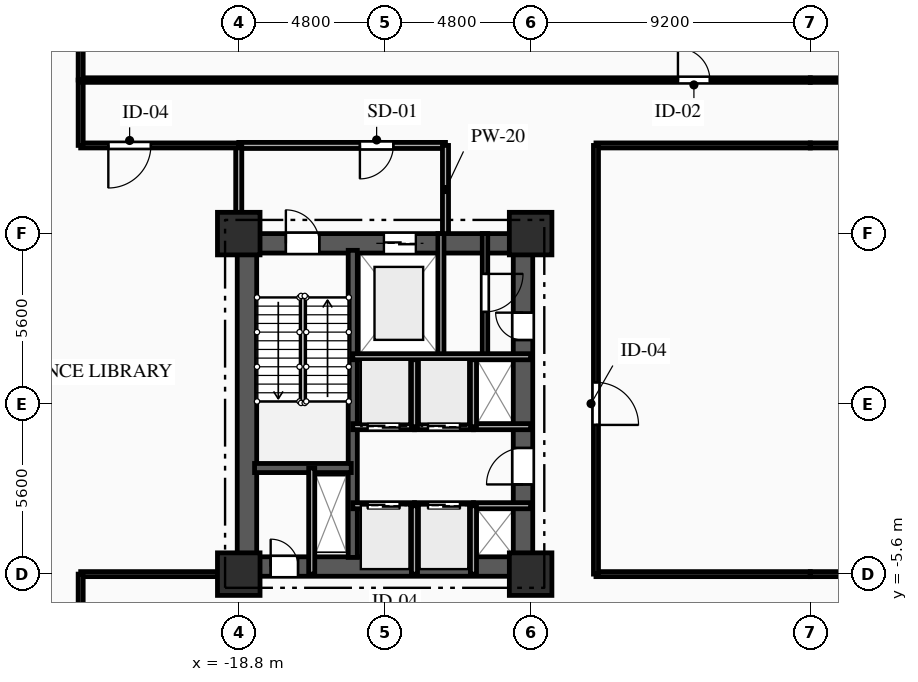
"""IFC4 building model, lengths in metres.
Left out: names, types, materials, properties, quantities, classifications, styles, units other than length and angle.
Written with IfcOpenShell. Run it as: python <this file> out.ifc"""

import sys

from ifc_helpers import new_model, si_unit, direction, frame, frame_2d, origin, origin_2d, place, context, subcontext, project, spatial, rectangle, extrude, element, fill, save


model = new_model("IFC4")
c1 = context("Model", 3, precision=1e-05, world=origin(), true_north=direction((0.0, 1.0)))
c2 = subcontext(c1, "Body", "Model", "MODEL_VIEW")
j1 = project(units=[si_unit("LENGTHUNIT", "METRE"), si_unit("PLANEANGLEUNIT", "RADIAN")], contexts=[c1])
p1 = place(None, origin())
s1 = spatial("IfcSite", under=j1, at=p1, CompositionType="ELEMENT")
p2 = place(p1, origin())
s2 = spatial("IfcBuilding", under=s1, at=p2, CompositionType="ELEMENT")
p3 = place(p2, frame((0.0, 0.0, 4.5)))
s3 = spatial("IfcBuildingStorey", under=s2, at=p3, CompositionType="ELEMENT", Elevation=4.5)
for number, where, z_axis, x_axis in (
    (1, (-18.8, -5.6, 0.0), (0.0, 0.0, 1.0), (1.0, 0.0, 0.0)),
    (2, (-18.8, 5.6, 0.0), (0.0, 0.0, 1.0), (1.0, 0.0, 0.0)),
    (3, (-9.2, -5.6, 0.0), (0.0, 0.0, 1.0), (1.0, 0.0, 0.0)),
    (4, (-9.2, 5.6, 0.0), (0.0, 0.0, 1.0), (1.0, 0.0, 0.0)),
):
    element("IfcColumn", number, at=place(p3, frame(where, z_axis=z_axis, x_axis=x_axis)), inside=s3, PredefinedType="COLUMN", context=c2, shape_type="SweptSolid", body=[
        extrude(rectangle(XDim=1.4, YDim=1.4, at=origin_2d()), origin(), (0.0, 0.0, 1.0), 4.5),
    ])
p4 = place(p3, frame((-18.8, 5.28, 0.0), z_axis=(0.0, 0.0, 1.0), x_axis=(1.0, 0.0, 0.0)))
e5 = element("IfcWall", 5, at=p4, inside=s3, PredefinedType="SHEAR", context=c2, shape_type="SweptSolid", body=[
    extrude(rectangle(XDim=9.6, YDim=0.64, at=frame_2d((4.8, 0.0))), origin(), (0.0, 0.0, 1.0), 4.17),
])
p5 = place(p4, frame((1.55, 0.0, 0.0)))
e6 = element("IfcOpeningElement", 6, at=p5, cuts=e5, PredefinedType="OPENING", context=c2, shape_type="SweptSolid", body=[
    extrude(rectangle(XDim=1.1, YDim=2.15, at=frame_2d((0.55, 1.075))), frame((0.0, 0.33, 0.0), z_axis=(0.0, -1.0, 0.0), x_axis=(1.0, 0.0, 0.0)), (0.0, 0.0, 1.0), 0.66),
])
p6 = place(p4, frame((4.775, 0.0, 0.0)))
e7 = element("IfcOpeningElement", 7, at=p6, cuts=e5, PredefinedType="OPENING", context=c2, shape_type="SweptSolid", body=[
    extrude(rectangle(XDim=1.05, YDim=2.1, at=frame_2d((0.525, 1.05))), frame((0.0, 0.33, 0.0), z_axis=(0.0, -1.0, 0.0), x_axis=(1.0, 0.0, 0.0)), (0.0, 0.0, 1.0), 0.66),
])
p7 = place(p3, frame((-18.8, -5.35, 0.0), z_axis=(0.0, 0.0, 1.0), x_axis=(1.0, 0.0, 0.0)))
e8 = element("IfcWall", 8, at=p7, inside=s3, PredefinedType="SHEAR", context=c2, shape_type="SweptSolid", body=[
    extrude(rectangle(XDim=9.6, YDim=0.64, at=frame_2d((4.8, 0.0))), origin(), (0.0, 0.0, 1.0), 4.17),
])
p8 = place(p7, frame((1.05, 0.0, 0.0)))
e9 = element("IfcOpeningElement", 9, at=p8, cuts=e8, PredefinedType="OPENING", context=c2, shape_type="SweptSolid", body=[
    extrude(rectangle(XDim=0.9, YDim=2.1, at=frame_2d((0.45, 1.05))), frame((0.0, 0.33, 0.0), z_axis=(0.0, -1.0, 0.0), x_axis=(1.0, 0.0, 0.0)), (0.0, 0.0, 1.0), 0.66),
])
p9 = place(p3, frame((-18.53, -5.05, 0.0), z_axis=(0.0, 0.0, 1.0), x_axis=(0.0, 1.0, 0.0)))
e10 = element("IfcWall", 10, at=p9, inside=s3, PredefinedType="SHEAR", context=c2, shape_type="SweptSolid", body=[
    extrude(rectangle(XDim=10.1, YDim=0.64, at=frame_2d((5.05, 0.0))), origin(), (0.0, 0.0, 1.0), 4.17),
])
p10 = place(p3, frame((-9.45, -5.05, 0.0), z_axis=(0.0, 0.0, 1.0), x_axis=(0.0, 1.0, 0.0)))
e11 = element("IfcWall", 11, at=p10, inside=s3, PredefinedType="SHEAR", context=c2, shape_type="SweptSolid", body=[
    extrude(rectangle(XDim=10.1, YDim=0.64, at=frame_2d((5.05, 0.0))), origin(), (0.0, 0.0, 1.0), 4.17),
])
p11 = place(p10, frame((7.15, 0.0, 0.0)))
e12 = element("IfcOpeningElement", 12, at=p11, cuts=e11, PredefinedType="OPENING", context=c2, shape_type="SweptSolid", body=[
    extrude(rectangle(XDim=0.9, YDim=2.1, at=frame_2d((0.45, 1.05))), frame((0.0, 0.33, 0.0), z_axis=(0.0, -1.0, 0.0), x_axis=(1.0, 0.0, 0.0)), (0.0, 0.0, 1.0), 0.66),
])
p12 = place(p10, frame((2.4, 0.0, 0.0)))
e13 = element("IfcOpeningElement", 13, at=p12, cuts=e11, PredefinedType="OPENING", context=c2, shape_type="SweptSolid", body=[
    extrude(rectangle(XDim=1.2, YDim=2.15, at=frame_2d((0.6, 1.075))), frame((0.0, 0.33, 0.0), z_axis=(0.0, -1.0, 0.0), x_axis=(1.0, 0.0, 0.0)), (0.0, 0.0, 1.0), 0.66),
])
p13 = place(p3, frame((-15.05, -5.05, 0.0), z_axis=(0.0, 0.0, 1.0), x_axis=(0.0, 1.0, 0.0)))
e14 = element("IfcWall", 14, at=p13, inside=s3, PredefinedType="SHEAR", context=c2, shape_type="SweptSolid", body=[
    extrude(rectangle(XDim=10.1, YDim=0.3, at=frame_2d((5.05, 0.0))), origin(), (0.0, 0.0, 1.0), 4.17),
])
p14 = place(p3, frame((-18.28, -2.11, 0.0), z_axis=(0.0, 0.0, 1.0), x_axis=(1.0, 0.0, 0.0)))
e15 = element("IfcWall", 15, at=p14, inside=s3, PredefinedType="SHEAR", context=c2, shape_type="SweptSolid", body=[
    extrude(rectangle(XDim=3.18, YDim=0.3, at=frame_2d((1.59, 0.0))), origin(), (0.0, 0.0, 1.0), 4.17),
])
p15 = place(p3, frame((-16.4, -5.6, 0.0), z_axis=(0.0, 0.0, 1.0), x_axis=(0.0, 1.0, 0.0)))
e16 = element("IfcWall", 16, at=p15, inside=s3, PredefinedType="PARTITIONING", context=c2, shape_type="SweptSolid", body=[
    extrude(rectangle(XDim=3.49, YDim=0.2, at=frame_2d((1.745, 0.0))), origin(), (0.0, 0.0, 1.0), 4.17),
])
p16 = place(p3, frame((-12.15, 1.55, 0.0), z_axis=(0.0, 0.0, 1.0), x_axis=(0.0, 1.0, 0.0)))
e17 = element("IfcWall", 17, at=p16, inside=s3, PredefinedType="PARTITIONING", context=c2, shape_type="SweptSolid", body=[
    extrude(rectangle(XDim=4.05, YDim=0.2, at=frame_2d((2.025, 0.0))), origin(), (0.0, 0.0, 1.0), 4.17),
])
p17 = place(p3, frame((-12.0, 8.5, 0.0), z_axis=(0.0, 0.0, 1.0), x_axis=(-1.0, 0.0, 0.0)))
e18 = element("IfcWall", 18, at=p17, inside=s3, PredefinedType="PARTITIONING", context=c2, shape_type="SweptSolid", body=[
    extrude(rectangle(XDim=6.8, YDim=0.2, at=frame_2d((3.4, 0.0))), origin(), (0.0, 0.0, 1.0), 4.17),
])
p18 = place(p17, frame((1.715, 0.0, 0.0)))
e19 = element("IfcOpeningElement", 19, at=p18, cuts=e18, PredefinedType="OPENING", context=c2, shape_type="SweptSolid", body=[
    extrude(rectangle(XDim=1.1, YDim=2.15, at=frame_2d((0.55, 1.075))), frame((0.0, 0.11, 0.0), z_axis=(0.0, -1.0, 0.0), x_axis=(1.0, 0.0, 0.0)), (0.0, 0.0, 1.0), 0.22),
])
p19 = place(p3, frame((-12.0, 5.6, 0.0), z_axis=(0.0, 0.0, 1.0), x_axis=(0.0, 1.0, 0.0)))
e20 = element("IfcWall", 20, at=p19, inside=s3, PredefinedType="PARTITIONING", context=c2, shape_type="SweptSolid", body=[
    extrude(rectangle(XDim=2.9, YDim=0.2, at=frame_2d((1.45, 0.0))), origin(), (0.0, 0.0, 1.0), 4.17),
])
p20 = place(p3, frame((-18.8, 8.5, 0.0), z_axis=(0.0, 0.0, 1.0), x_axis=(0.0, -1.0, 0.0)))
e21 = element("IfcWall", 21, at=p20, inside=s3, PredefinedType="PARTITIONING", context=c2, shape_type="SweptSolid", body=[
    extrude(rectangle(XDim=2.9, YDim=0.2, at=frame_2d((1.45, 0.0))), origin(), (0.0, 0.0, 1.0), 3.655),
])
p21 = place(p3, frame((-10.7, 5.6, 0.0), z_axis=(0.0, 0.0, 1.0), x_axis=(0.0, -1.0, 0.0)))
e22 = element("IfcWall", 22, at=p21, inside=s3, PredefinedType="PARTITIONING", context=c2, shape_type="SweptSolid", body=[
    extrude(rectangle(XDim=4.05, YDim=0.18, at=frame_2d((2.025, 0.0))), origin(), (0.0, 0.0, 1.0), 4.17),
])
p22 = place(p21, frame((1.325, 0.0, 0.0)))
e23 = element("IfcOpeningElement", 23, at=p22, cuts=e22, PredefinedType="OPENING", context=c2, shape_type="SweptSolid", body=[
    extrude(rectangle(XDim=1.25, YDim=2.2, at=frame_2d((0.625, 1.1))), frame((0.0, 0.1, 0.0), z_axis=(0.0, -1.0, 0.0), x_axis=(1.0, 0.0, 0.0)), (0.0, 0.0, 1.0), 0.2),
])
p23 = place(p3, frame((-15.05, -3.35, 0.0), z_axis=(0.0, 0.0, 1.0), x_axis=(1.0, 0.0, 0.0)))
e24 = element("IfcWall", 24, at=p23, inside=s3, PredefinedType="PARTITIONING", context=c2, shape_type="SweptSolid", body=[
    extrude(rectangle(XDim=2.03, YDim=0.2, at=frame_2d((1.015, 0.0))), origin(), (0.0, 0.0, 1.0), 4.17),
])
p24 = place(p23, frame((0.49, 0.0, 0.0)))
e25 = element("IfcOpeningElement", 25, at=p24, cuts=e24, PredefinedType="OPENING", context=c2, shape_type="SweptSolid", body=[
    extrude(rectangle(XDim=1.05, YDim=2.1, at=frame_2d((0.525, 1.05))), frame((0.0, 0.11, 0.0), z_axis=(0.0, -1.0, 0.0), x_axis=(1.0, 0.0, 0.0)), (0.0, 0.0, 1.0), 0.22),
])
p25 = place(p3, frame((-13.02, -3.35, 0.0), z_axis=(0.0, 0.0, 1.0), x_axis=(1.0, 0.0, 0.0)))
e26 = element("IfcWall", 26, at=p25, inside=s3, PredefinedType="PARTITIONING", context=c2, shape_type="SweptSolid", body=[
    extrude(rectangle(XDim=1.94, YDim=0.2, at=frame_2d((0.97, 0.0))), origin(), (0.0, 0.0, 1.0), 4.17),
])
p26 = place(p25, frame((0.445, 0.0, 0.0)))
e27 = element("IfcOpeningElement", 27, at=p26, cuts=e26, PredefinedType="OPENING", context=c2, shape_type="SweptSolid", body=[
    extrude(rectangle(XDim=1.05, YDim=2.1, at=frame_2d((0.525, 1.05))), frame((0.0, 0.11, 0.0), z_axis=(0.0, -1.0, 0.0), x_axis=(1.0, 0.0, 0.0)), (0.0, 0.0, 1.0), 0.22),
])
p27 = place(p3, frame((-11.08, -3.35, 0.0), z_axis=(0.0, 0.0, 1.0), x_axis=(1.0, 0.0, 0.0)))
e28 = element("IfcWall", 28, at=p27, inside=s3, PredefinedType="PARTITIONING", context=c2, shape_type="SweptSolid", body=[
    extrude(rectangle(XDim=1.88, YDim=0.2, at=frame_2d((0.94, 0.0))), origin(), (0.0, 0.0, 1.0), 3.885),
])
p28 = place(p3, frame((-13.02, -0.75, 0.0), z_axis=(0.0, 0.0, 1.0), x_axis=(-1.0, 0.0, 0.0)))
e29 = element("IfcWall", 29, at=p28, inside=s3, PredefinedType="PARTITIONING", context=c2, shape_type="SweptSolid", body=[
    extrude(rectangle(XDim=2.03, YDim=0.2, at=frame_2d((1.015, 0.0))), origin(), (0.0, 0.0, 1.0), 4.17),
])
p29 = place(p28, frame((0.49, 0.0, 0.0)))
e30 = element("IfcOpeningElement", 30, at=p29, cuts=e29, PredefinedType="OPENING", context=c2, shape_type="SweptSolid", body=[
    extrude(rectangle(XDim=1.05, YDim=2.1, at=frame_2d((0.525, 1.05))), frame((0.0, 0.11, 0.0), z_axis=(0.0, -1.0, 0.0), x_axis=(1.0, 0.0, 0.0)), (0.0, 0.0, 1.0), 0.22),
])
p30 = place(p3, frame((-11.08, -0.75, 0.0), z_axis=(0.0, 0.0, 1.0), x_axis=(-1.0, 0.0, 0.0)))
e31 = element("IfcWall", 31, at=p30, inside=s3, PredefinedType="PARTITIONING", context=c2, shape_type="SweptSolid", body=[
    extrude(rectangle(XDim=1.94, YDim=0.2, at=frame_2d((0.97, 0.0))), origin(), (0.0, 0.0, 1.0), 4.17),
])
p31 = place(p30, frame((0.445, 0.0, 0.0)))
e32 = element("IfcOpeningElement", 32, at=p31, cuts=e31, PredefinedType="OPENING", context=c2, shape_type="SweptSolid", body=[
    extrude(rectangle(XDim=1.05, YDim=2.1, at=frame_2d((0.525, 1.05))), frame((0.0, 0.11, 0.0), z_axis=(0.0, -1.0, 0.0), x_axis=(1.0, 0.0, 0.0)), (0.0, 0.0, 1.0), 0.22),
])
p32 = place(p3, frame((-9.2, -0.75, 0.0), z_axis=(0.0, 0.0, 1.0), x_axis=(-1.0, 0.0, 0.0)))
e33 = element("IfcWall", 33, at=p32, inside=s3, PredefinedType="PARTITIONING", context=c2, shape_type="SweptSolid", body=[
    extrude(rectangle(XDim=1.88, YDim=0.2, at=frame_2d((0.94, 0.0))), origin(), (0.0, 0.0, 1.0), 4.17),
])
for number, where, z_axis, x_axis in (
    (34, (-13.02, -5.6, 0.0), (0.0, 0.0, 1.0), (0.0, 1.0, 0.0)),
    (35, (-11.08, -5.6, 0.0), (0.0, 0.0, 1.0), (0.0, 1.0, 0.0)),
):
    element("IfcWall", number, at=place(p3, frame(where, z_axis=z_axis, x_axis=x_axis)), inside=s3, PredefinedType="PARTITIONING", context=c2, shape_type="SweptSolid", body=[
        extrude(rectangle(XDim=2.25, YDim=0.2, at=frame_2d((1.125, 0.0))), origin(), (0.0, 0.0, 1.0), 4.17),
    ])
for number, where, z_axis, x_axis in (
    (36, (-13.02, -0.75, 0.0), (0.0, 0.0, 1.0), (0.0, 1.0, 0.0)),
    (37, (-11.08, -0.75, 0.0), (0.0, 0.0, 1.0), (0.0, 1.0, 0.0)),
):
    element("IfcWall", number, at=place(p3, frame(where, z_axis=z_axis, x_axis=x_axis)), inside=s3, PredefinedType="PARTITIONING", context=c2, shape_type="SweptSolid", body=[
        extrude(rectangle(XDim=2.3, YDim=0.2, at=frame_2d((1.15, 0.0))), origin(), (0.0, 0.0, 1.0), 4.17),
    ])
p33 = place(p3, frame((-18.8, 8.5, 0.0), z_axis=(0.0, 0.0, 1.0), x_axis=(-1.0, 0.0, 0.0)))
e38 = element("IfcWall", 38, at=p33, inside=s3, PredefinedType="PARTITIONING", context=c2, shape_type="SweptSolid", body=[
    extrude(rectangle(XDim=5.2, YDim=0.165, at=frame_2d((2.6, 0.0))), origin(), (0.0, 0.0, 1.0), 4.17),
])
p34 = place(p33, frame((2.89, 0.0, 0.0)))
e39 = element("IfcOpeningElement", 39, at=p34, cuts=e38, PredefinedType="OPENING", context=c2, shape_type="SweptSolid", body=[
    extrude(rectangle(XDim=1.4, YDim=2.3, at=frame_2d((0.7, 1.15))), frame((0.0, 0.093, 0.0), z_axis=(0.0, -1.0, 0.0), x_axis=(1.0, 0.0, 0.0)), (0.0, 0.0, 1.0), 0.185),
])
p35 = place(p3, frame((-24.0, 8.5, 0.0), z_axis=(0.0, 0.0, 1.0), x_axis=(0.0, 1.0, 0.0)))
e40 = element("IfcWall", 40, at=p35, inside=s3, PredefinedType="PARTITIONING", context=c2, shape_type="SweptSolid", body=[
    extrude(rectangle(XDim=2.15, YDim=0.165, at=frame_2d((1.075, 0.0))), origin(), (0.0, 0.0, 1.0), 4.17),
])
p36 = place(p3, frame((-24.0, 10.65, 0.0), z_axis=(0.0, 0.0, 1.0), x_axis=(1.0, 0.0, 0.0)))
e41 = element("IfcWall", 41, at=p36, inside=s3, PredefinedType="PARTITIONING", context=c2, shape_type="SweptSolid", body=[
    extrude(rectangle(XDim=24.0, YDim=0.15, at=frame_2d((12.0, 0.0))), origin(), (0.0, 0.0, 1.0), 4.17),
])
p37 = place(p36, frame((19.646, 0.0, 0.0)))
e42 = element("IfcOpeningElement", 42, at=p37, cuts=e41, PredefinedType="OPENING", context=c2, shape_type="SweptSolid", body=[
    extrude(rectangle(XDim=1.05, YDim=2.15, at=frame_2d((0.525, 1.075))), frame((0.0, 0.085, 0.0), z_axis=(0.0, -1.0, 0.0), x_axis=(1.0, 0.0, 0.0)), (0.0, 0.0, 1.0), 0.17),
])
p38 = place(p3, frame((0.0, 8.5, 0.0), z_axis=(0.0, 0.0, 1.0), x_axis=(-1.0, 0.0, 0.0)))
e43 = element("IfcWall", 43, at=p38, inside=s3, PredefinedType="PARTITIONING", context=c2, shape_type="SweptSolid", body=[
    extrude(rectangle(XDim=7.05, YDim=0.165, at=frame_2d((3.525, 0.0))), origin(), (0.0, 0.0, 1.0), 4.17),
])
p39 = place(p3, frame((0.0, 10.65, 0.0), z_axis=(0.0, 0.0, 1.0), x_axis=(1.0, 0.0, 0.0)))
e44 = element("IfcWall", 44, at=p39, inside=s3, PredefinedType="PARTITIONING", context=c2, shape_type="SweptSolid", body=[
    extrude(rectangle(XDim=24.0, YDim=0.15, at=frame_2d((12.0, 0.0))), origin(), (0.0, 0.0, 1.0), 4.17),
])
p40 = place(p3, frame((7.05, 8.5, 0.0), z_axis=(0.0, 0.0, 1.0), x_axis=(-1.0, 0.0, 0.0)))
e45 = element("IfcWall", 45, at=p40, inside=s3, PredefinedType="PARTITIONING", context=c2, shape_type="SweptSolid", body=[
    extrude(rectangle(XDim=7.05, YDim=0.165, at=frame_2d((3.525, 0.0))), origin(), (0.0, 0.0, 1.0), 4.17),
])
p41 = place(p3, frame((-24.0, -5.6, 0.0), z_axis=(0.0, 0.0, 1.0), x_axis=(1.0, 0.0, 0.0)))
e46 = element("IfcWall", 46, at=p41, inside=s3, PredefinedType="PARTITIONING", context=c2, shape_type="SweptSolid", body=[
    extrude(rectangle(XDim=5.2, YDim=0.165, at=frame_2d((2.6, 0.0))), origin(), (0.0, 0.0, 1.0), 4.17),
])
p42 = place(p3, frame((-24.0, -7.75, 0.0), z_axis=(0.0, 0.0, 1.0), x_axis=(0.0, 1.0, 0.0)))
e47 = element("IfcWall", 47, at=p42, inside=s3, PredefinedType="PARTITIONING", context=c2, shape_type="SweptSolid", body=[
    extrude(rectangle(XDim=2.15, YDim=0.165, at=frame_2d((1.075, 0.0))), origin(), (0.0, 0.0, 1.0), 4.17),
])
for number, where, z_axis, x_axis in (
    (48, (-7.05, -5.6, 0.0), (0.0, 0.0, 1.0), (1.0, 0.0, 0.0)),
    (49, (0.0, -5.6, 0.0), (0.0, 0.0, 1.0), (1.0, 0.0, 0.0)),
):
    element("IfcWall", number, at=place(p3, frame(where, z_axis=z_axis, x_axis=x_axis)), inside=s3, PredefinedType="PARTITIONING", context=c2, shape_type="SweptSolid", body=[
        extrude(rectangle(XDim=7.05, YDim=0.165, at=frame_2d((3.525, 0.0))), origin(), (0.0, 0.0, 1.0), 3.655),
    ])
p43 = place(p3, frame((-7.05, 8.5, 0.0), z_axis=(0.0, 0.0, 1.0), x_axis=(0.0, -1.0, 0.0)))
e50 = element("IfcWall", 50, at=p43, inside=s3, PredefinedType="PARTITIONING", context=c2, shape_type="SweptSolid", body=[
    extrude(rectangle(XDim=14.1, YDim=0.165, at=frame_2d((7.05, 0.0))), origin(), (0.0, 0.0, 1.0), 4.17),
])
p44 = place(p43, frame((7.792, 0.0, 0.0)))
e51 = element("IfcOpeningElement", 51, at=p44, cuts=e50, PredefinedType="OPENING", context=c2, shape_type="SweptSolid", body=[
    extrude(rectangle(XDim=1.4, YDim=2.3, at=frame_2d((0.7, 1.15))), frame((0.0, 0.093, 0.0), z_axis=(0.0, -1.0, 0.0), x_axis=(1.0, 0.0, 0.0)), (0.0, 0.0, 1.0), 0.185),
])
p45 = place(p3, frame((-24.0, 24.8, 0.0), z_axis=(0.0, 0.0, 1.0), x_axis=(0.0, -1.0, 0.0)))
e52 = element("IfcWall", 52, at=p45, inside=s3, PredefinedType="PARTITIONING", context=c2, shape_type="SweptSolid", body=[
    extrude(rectangle(XDim=14.15, YDim=0.165, at=frame_2d((7.075, 0.0))), origin(), (0.0, 0.0, 1.0), 4.17),
])
p46 = place(p3, frame((-15.05, 1.55, 0.0), z_axis=(0.0, 0.0, 1.0), x_axis=(1.0, 0.0, 0.0)))
e53 = element("IfcWall", 53, at=p46, inside=s3, PredefinedType="PARTITIONING", context=c2, shape_type="SweptSolid", body=[
    extrude(rectangle(XDim=5.85, YDim=0.2, at=frame_2d((2.925, 0.0))), origin(), (0.0, 0.0, 1.0), 4.17),
])
p47 = place(p5, origin())
e54 = element("IfcDoor", 54, at=p47, inside=s3, OperationType="SINGLE_SWING_LEFT", PredefinedType="DOOR", context=c2, shape_type="SweptSolid", body=[
    extrude(rectangle(XDim=1.1, YDim=2.15, at=frame_2d((0.55, 1.075))), frame((0.0, 0.025, 0.0), z_axis=(0.0, -1.0, 0.0), x_axis=(1.0, 0.0, 0.0)), (0.0, 0.0, 1.0), 0.05),
])
fill(e6, e54)
p48 = place(p6, origin())
e55 = element("IfcDoor", 55, at=p48, inside=s3, OperationType="DOUBLE_DOOR_SLIDING", PredefinedType="DOOR", context=c2, shape_type="SweptSolid", body=[
    extrude(rectangle(XDim=1.05, YDim=2.1, at=frame_2d((0.525, 1.05))), frame((0.0, 0.025, 0.0), z_axis=(0.0, -1.0, 0.0), x_axis=(1.0, 0.0, 0.0)), (0.0, 0.0, 1.0), 0.05),
])
fill(e7, e55)
p49 = place(p8, origin())
e56 = element("IfcDoor", 56, at=p49, inside=s3, OperationType="SINGLE_SWING_LEFT", PredefinedType="DOOR", context=c2, shape_type="SweptSolid", body=[
    extrude(rectangle(XDim=0.9, YDim=2.1, at=frame_2d((0.45, 1.05))), frame((0.0, 0.025, 0.0), z_axis=(0.0, -1.0, 0.0), x_axis=(1.0, 0.0, 0.0)), (0.0, 0.0, 1.0), 0.05),
])
fill(e9, e56)
p50 = place(p18, origin())
e57 = element("IfcDoor", 57, at=p50, inside=s3, OperationType="SINGLE_SWING_RIGHT", PredefinedType="DOOR", context=c2, shape_type="SweptSolid", body=[
    extrude(rectangle(XDim=1.1, YDim=2.15, at=frame_2d((0.55, 1.075))), frame((0.0, 0.025, 0.0), z_axis=(0.0, -1.0, 0.0), x_axis=(1.0, 0.0, 0.0)), (0.0, 0.0, 1.0), 0.05),
])
fill(e19, e57)
p51 = place(p22, origin())
e58 = element("IfcDoor", 58, at=p51, inside=s3, OperationType="SINGLE_SWING_LEFT", PredefinedType="DOOR", context=c2, shape_type="SweptSolid", body=[
    extrude(rectangle(XDim=1.25, YDim=2.2, at=frame_2d((0.625, 1.1))), frame((0.0, 0.025, 0.0), z_axis=(0.0, -1.0, 0.0), x_axis=(1.0, 0.0, 0.0)), (0.0, 0.0, 1.0), 0.05),
])
fill(e23, e58)
p52 = place(p11, origin())
e59 = element("IfcDoor", 59, at=p52, inside=s3, OperationType="SINGLE_SWING_RIGHT", PredefinedType="DOOR", context=c2, shape_type="SweptSolid", body=[
    extrude(rectangle(XDim=0.9, YDim=2.1, at=frame_2d((0.45, 1.05))), frame((0.0, 0.025, 0.0), z_axis=(0.0, -1.0, 0.0), x_axis=(1.0, 0.0, 0.0)), (0.0, 0.0, 1.0), 0.05),
])
fill(e12, e59)
p53 = place(p24, origin())
e60 = element("IfcDoor", 60, at=p53, inside=s3, OperationType="DOUBLE_DOOR_SLIDING", PredefinedType="DOOR", context=c2, shape_type="SweptSolid", body=[
    extrude(rectangle(XDim=1.05, YDim=2.1, at=frame_2d((0.525, 1.05))), frame((0.0, 0.025, 0.0), z_axis=(0.0, -1.0, 0.0), x_axis=(1.0, 0.0, 0.0)), (0.0, 0.0, 1.0), 0.05),
])
fill(e25, e60)
p54 = place(p26, origin())
e61 = element("IfcDoor", 61, at=p54, inside=s3, OperationType="DOUBLE_DOOR_SLIDING", PredefinedType="DOOR", context=c2, shape_type="SweptSolid", body=[
    extrude(rectangle(XDim=1.05, YDim=2.1, at=frame_2d((0.525, 1.05))), frame((0.0, 0.025, 0.0), z_axis=(0.0, -1.0, 0.0), x_axis=(1.0, 0.0, 0.0)), (0.0, 0.0, 1.0), 0.05),
])
fill(e27, e61)
p55 = place(p29, origin())
e62 = element("IfcDoor", 62, at=p55, inside=s3, OperationType="DOUBLE_DOOR_SLIDING", PredefinedType="DOOR", context=c2, shape_type="SweptSolid", body=[
    extrude(rectangle(XDim=1.05, YDim=2.1, at=frame_2d((0.525, 1.05))), frame((0.0, 0.025, 0.0), z_axis=(0.0, -1.0, 0.0), x_axis=(1.0, 0.0, 0.0)), (0.0, 0.0, 1.0), 0.05),
])
fill(e30, e62)
p56 = place(p31, origin())
e63 = element("IfcDoor", 63, at=p56, inside=s3, OperationType="DOUBLE_DOOR_SLIDING", PredefinedType="DOOR", context=c2, shape_type="SweptSolid", body=[
    extrude(rectangle(XDim=1.05, YDim=2.1, at=frame_2d((0.525, 1.05))), frame((0.0, 0.025, 0.0), z_axis=(0.0, -1.0, 0.0), x_axis=(1.0, 0.0, 0.0)), (0.0, 0.0, 1.0), 0.05),
])
fill(e32, e63)
p57 = place(p12, origin())
e64 = element("IfcDoor", 64, at=p57, inside=s3, OperationType="SINGLE_SWING_LEFT", PredefinedType="DOOR", context=c2, shape_type="SweptSolid", body=[
    extrude(rectangle(XDim=1.2, YDim=2.15, at=frame_2d((0.6, 1.075))), frame((0.0, 0.025, 0.0), z_axis=(0.0, -1.0, 0.0), x_axis=(1.0, 0.0, 0.0)), (0.0, 0.0, 1.0), 0.05),
])
fill(e13, e64)
p58 = place(p34, origin())
e65 = element("IfcDoor", 65, at=p58, inside=s3, OperationType="SINGLE_SWING_RIGHT", PredefinedType="DOOR", context=c2, shape_type="SweptSolid", body=[
    extrude(rectangle(XDim=1.4, YDim=2.3, at=frame_2d((0.7, 1.15))), frame((0.0, 0.025, 0.0), z_axis=(0.0, -1.0, 0.0), x_axis=(1.0, 0.0, 0.0)), (0.0, 0.0, 1.0), 0.05),
])
fill(e39, e65)
p59 = place(p37, origin())
e66 = element("IfcDoor", 66, at=p59, inside=s3, OperationType="SINGLE_SWING_LEFT", PredefinedType="DOOR", context=c2, shape_type="SweptSolid", body=[
    extrude(rectangle(XDim=1.05, YDim=2.15, at=frame_2d((0.525, 1.075))), frame((0.0, 0.025, 0.0), z_axis=(0.0, -1.0, 0.0), x_axis=(1.0, 0.0, 0.0)), (0.0, 0.0, 1.0), 0.05),
])
fill(e42, e66)
p60 = place(p44, origin())
e67 = element("IfcDoor", 67, at=p60, inside=s3, OperationType="SINGLE_SWING_RIGHT", PredefinedType="DOOR", context=c2, shape_type="SweptSolid", body=[
    extrude(rectangle(XDim=1.4, YDim=2.3, at=frame_2d((0.7, 1.15))), frame((0.0, 0.025, 0.0), z_axis=(0.0, -1.0, 0.0), x_axis=(1.0, 0.0, 0.0)), (0.0, 0.0, 1.0), 0.05),
])
fill(e51, e67)
save(model, sys.argv[1])
